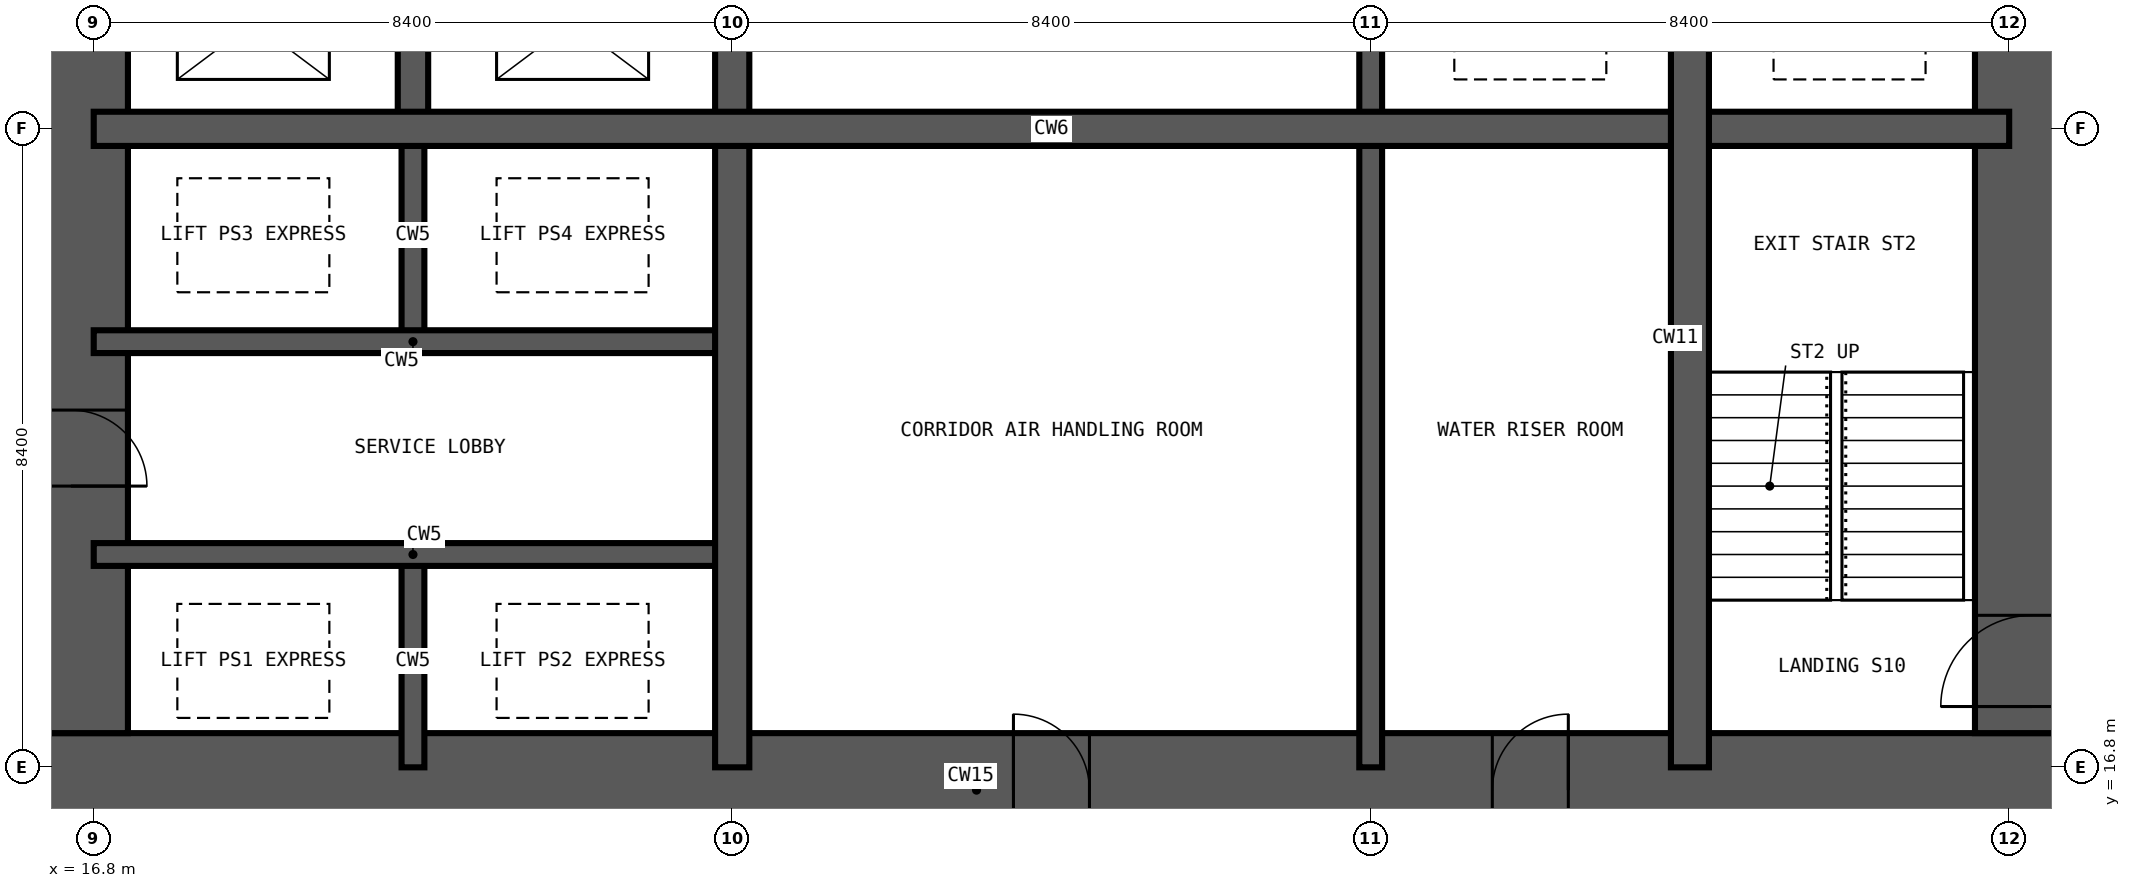
"""IFC4 building model, lengths in metres.
Left out: names, types, materials, properties, quantities, classifications, styles, units other than length and angle.
Written with IfcOpenShell. Run it as: python <this file> out.ifc"""

import sys

from ifc_helpers import new_model, si_unit, direction, frame, frame_2d, origin, place, context, subcontext, project, spatial, rectangle, extrude, element, fill, save


model = new_model("IFC4")
c1 = context("Model", 3, precision=1e-05, world=origin(), true_north=direction((0.0, 1.0)))
c2 = subcontext(c1, "Body", "Model", "MODEL_VIEW")
j1 = project(units=[si_unit("LENGTHUNIT", "METRE"), si_unit("PLANEANGLEUNIT", "RADIAN")], contexts=[c1])
p1 = place(None, origin())
s1 = spatial("IfcSite", under=j1, at=p1, CompositionType="ELEMENT")
p2 = place(p1, origin())
s2 = spatial("IfcBuilding", under=s1, at=p2, CompositionType="ELEMENT")
p3 = place(p2, frame((0.0, 0.0, 52.2)))
s3 = spatial("IfcBuildingStorey", under=s2, at=p3, CompositionType="ELEMENT", Elevation=52.2)
p4 = place(p3, frame((15.75, 16.5, -0.35), z_axis=(0.0, 0.0, 1.0), x_axis=(1.0, 0.0, 0.0)))
e1 = element("IfcWall", 1, at=p4, inside=s3, PredefinedType="SHEAR", context=c2, shape_type="SweptSolid", body=[
    extrude(rectangle(XDim=27.3, YDim=1.5, at=frame_2d((13.65, 0.0))), origin(), (0.0, 0.0, 1.0), 3.6),
])
p5 = place(p4, frame((13.15, 0.0, 0.35)))
e2 = element("IfcOpeningElement", 2, at=p5, cuts=e1, PredefinedType="OPENING", context=c2, shape_type="SweptSolid", body=[
    extrude(rectangle(XDim=1.0, YDim=2.1, at=frame_2d((0.5, 1.05))), frame((0.0, 0.76, 0.0), z_axis=(0.0, -1.0, 0.0), x_axis=(1.0, 0.0, 0.0)), (0.0, 0.0, 1.0), 1.52),
])
p6 = place(p4, frame((19.45, 0.0, 0.35)))
e3 = element("IfcOpeningElement", 3, at=p6, cuts=e1, PredefinedType="OPENING", context=c2, shape_type="SweptSolid", body=[
    extrude(rectangle(XDim=1.0, YDim=2.1, at=frame_2d((0.5, 1.05))), frame((0.0, 0.76, 0.0), z_axis=(0.0, -1.0, 0.0), x_axis=(1.0, 0.0, 0.0)), (0.0, 0.0, 1.0), 1.52),
])
p7 = place(p3, frame((42.3, 17.25, -0.35), z_axis=(0.0, 0.0, 1.0), x_axis=(0.0, 1.0, 0.0)))
e4 = element("IfcWall", 4, at=p7, inside=s3, PredefinedType="SHEAR", context=c2, shape_type="SweptSolid", body=[
    extrude(rectangle(XDim=24.3, YDim=1.5, at=frame_2d((12.15, 0.0))), origin(), (0.0, 0.0, 1.0), 3.6),
])
p8 = place(p7, frame((0.35, 0.0, 0.35)))
e5 = element("IfcOpeningElement", 5, at=p8, cuts=e4, PredefinedType="OPENING", context=c2, shape_type="SweptSolid", body=[
    extrude(rectangle(XDim=1.2, YDim=2.2, at=frame_2d((0.6, 1.1))), frame((0.0, 0.76, 0.0), z_axis=(0.0, -1.0, 0.0), x_axis=(1.0, 0.0, 0.0)), (0.0, 0.0, 1.0), 1.52),
])
p9 = place(p7, frame((11.65, 0.0, 0.35)))
e6 = element("IfcOpeningElement", 6, at=p9, cuts=e4, PredefinedType="OPENING", context=c2, shape_type="SweptSolid", body=[
    extrude(rectangle(XDim=1.0, YDim=2.1, at=frame_2d((0.5, 1.05))), frame((0.0, 0.76, 0.0), z_axis=(0.0, -1.0, 0.0), x_axis=(1.0, 0.0, 0.0)), (0.0, 0.0, 1.0), 1.52),
])
p10 = place(p7, frame((20.05, 0.0, 0.35)))
e7 = element("IfcOpeningElement", 7, at=p10, cuts=e4, PredefinedType="OPENING", context=c2, shape_type="SweptSolid", body=[
    extrude(rectangle(XDim=1.0, YDim=2.1, at=frame_2d((0.5, 1.05))), frame((0.0, 0.76, 0.0), z_axis=(0.0, -1.0, 0.0), x_axis=(1.0, 0.0, 0.0)), (0.0, 0.0, 1.0), 1.52),
])
p11 = place(p3, frame((16.5, 41.55, -0.35), z_axis=(0.0, 0.0, 1.0), x_axis=(0.0, -1.0, 0.0)))
e8 = element("IfcWall", 8, at=p11, inside=s3, PredefinedType="SHEAR", context=c2, shape_type="SweptSolid", body=[
    extrude(rectangle(XDim=24.3, YDim=1.5, at=frame_2d((12.15, 0.0))), origin(), (0.0, 0.0, 1.0), 3.6),
])
p12 = place(p11, frame((11.25, 0.0, 0.35)))
e9 = element("IfcOpeningElement", 9, at=p12, cuts=e8, PredefinedType="OPENING", context=c2, shape_type="SweptSolid", body=[
    extrude(rectangle(XDim=1.8, YDim=2.2, at=frame_2d((0.9, 1.1))), frame((0.0, 0.76, 0.0), z_axis=(0.0, -1.0, 0.0), x_axis=(1.0, 0.0, 0.0)), (0.0, 0.0, 1.0), 1.52),
])
p13 = place(p11, frame((20.05, 0.0, 0.35)))
e10 = element("IfcOpeningElement", 10, at=p13, cuts=e8, PredefinedType="OPENING", context=c2, shape_type="SweptSolid", body=[
    extrude(rectangle(XDim=1.0, YDim=2.1, at=frame_2d((0.5, 1.05))), frame((0.0, 0.76, 0.0), z_axis=(0.0, -1.0, 0.0), x_axis=(1.0, 0.0, 0.0)), (0.0, 0.0, 1.0), 1.52),
])
p14 = place(p11, frame((5.35, 0.0, 0.35)))
e11 = element("IfcOpeningElement", 11, at=p14, cuts=e8, PredefinedType="OPENING", context=c2, shape_type="SweptSolid", body=[
    extrude(rectangle(XDim=1.0, YDim=2.1, at=frame_2d((0.5, 1.05))), frame((0.0, 0.76, 0.0), z_axis=(0.0, -1.0, 0.0), x_axis=(1.0, 0.0, 0.0)), (0.0, 0.0, 1.0), 1.52),
])
for number, where, z_axis, x_axis in (
    (12, (21.0, 16.8, -0.35), (0.0, 0.0, 1.0), (0.0, 1.0, 0.0)),
    (13, (21.0, 22.4, -0.35), (0.0, 0.0, 1.0), (0.0, 1.0, 0.0)),
):
    element("IfcWall", number, at=place(p3, frame(where, z_axis=z_axis, x_axis=x_axis)), inside=s3, PredefinedType="SHEAR", context=c2, shape_type="SweptSolid", body=[
        extrude(rectangle(XDim=2.8, YDim=0.3, at=frame_2d((1.4, 0.0))), origin(), (0.0, 0.0, 1.0), 3.6),
    ])
p15 = place(p3, frame((33.6, 16.8, -0.35), z_axis=(0.0, 0.0, 1.0), x_axis=(0.0, 1.0, 0.0)))
e14 = element("IfcWall", 14, at=p15, inside=s3, PredefinedType="SHEAR", context=c2, shape_type="SweptSolid", body=[
    extrude(rectangle(XDim=25.2, YDim=0.3, at=frame_2d((12.6, 0.0))), origin(), (0.0, 0.0, 1.0), 3.6),
])
p16 = place(p15, frame((22.5, 0.0, 0.35)))
e15 = element("IfcOpeningElement", 15, at=p16, cuts=e14, PredefinedType="OPENING", context=c2, shape_type="SweptSolid", body=[
    extrude(rectangle(XDim=1.2, YDim=2.2, at=frame_2d((0.6, 1.1))), frame((0.0, 0.16, 0.0), z_axis=(0.0, -1.0, 0.0), x_axis=(1.0, 0.0, 0.0)), (0.0, 0.0, 1.0), 0.32),
])
p17 = place(p15, frame((18.3, 0.0, 0.35)))
e16 = element("IfcOpeningElement", 16, at=p17, cuts=e14, PredefinedType="OPENING", context=c2, shape_type="SweptSolid", body=[
    extrude(rectangle(XDim=1.2, YDim=2.2, at=frame_2d((0.6, 1.1))), frame((0.0, 0.16, 0.0), z_axis=(0.0, -1.0, 0.0), x_axis=(1.0, 0.0, 0.0)), (0.0, 0.0, 1.0), 0.32),
])
p18 = place(p15, frame((12.1, 0.0, 0.35)))
e17 = element("IfcOpeningElement", 17, at=p18, cuts=e14, PredefinedType="OPENING", context=c2, shape_type="SweptSolid", body=[
    extrude(rectangle(XDim=1.0, YDim=2.1, at=frame_2d((0.5, 1.05))), frame((0.0, 0.16, 0.0), z_axis=(0.0, -1.0, 0.0), x_axis=(1.0, 0.0, 0.0)), (0.0, 0.0, 1.0), 0.32),
])
for number, where, z_axis, x_axis in (
    (18, (16.8, 19.6, -0.35), (0.0, 0.0, 1.0), (1.0, 0.0, 0.0)),
    (19, (16.8, 22.4, -0.35), (0.0, 0.0, 1.0), (1.0, 0.0, 0.0)),
):
    element("IfcWall", number, at=place(p3, frame(where, z_axis=z_axis, x_axis=x_axis)), inside=s3, PredefinedType="SHEAR", context=c2, shape_type="SweptSolid", body=[
        extrude(rectangle(XDim=8.4, YDim=0.3, at=frame_2d((4.2, 0.0))), origin(), (0.0, 0.0, 1.0), 3.6),
    ])
p19 = place(p3, frame((21.0, 25.2, -0.35), z_axis=(0.0, 0.0, 1.0), x_axis=(0.0, 1.0, 0.0)))
e20 = element("IfcWall", 20, at=p19, inside=s3, PredefinedType="SHEAR", context=c2, shape_type="SweptSolid", body=[
    extrude(rectangle(XDim=2.8, YDim=0.4, at=frame_2d((1.4, 0.0))), origin(), (0.0, 0.0, 1.0), 3.6),
])
for number, where, z_axis, x_axis in (
    (21, (25.2, 16.8, -0.35), (0.0, 0.0, 1.0), (0.0, 1.0, 0.0)),
    (22, (16.8, 25.2, -0.35), (0.0, 0.0, 1.0), (1.0, 0.0, 0.0)),
):
    element("IfcWall", number, at=place(p3, frame(where, z_axis=z_axis, x_axis=x_axis)), inside=s3, PredefinedType="SHEAR", context=c2, shape_type="SweptSolid", body=[
        extrude(rectangle(XDim=25.2, YDim=0.45, at=frame_2d((12.6, 0.0))), origin(), (0.0, 0.0, 1.0), 3.6),
    ])
p20 = place(p3, frame((37.8, 16.8, -0.35), z_axis=(0.0, 0.0, 1.0), x_axis=(0.0, 1.0, 0.0)))
e23 = element("IfcWall", 23, at=p20, inside=s3, PredefinedType="SHEAR", context=c2, shape_type="SweptSolid", body=[
    extrude(rectangle(XDim=11.2, YDim=0.5, at=frame_2d((5.6, 0.0))), origin(), (0.0, 0.0, 1.0), 3.6),
])
p21 = place(p8, origin())
e24 = element("IfcDoor", 24, at=p21, inside=s3, OperationType="SINGLE_SWING_LEFT", PredefinedType="DOOR", context=c2, shape_type="SweptSolid", body=[
    extrude(rectangle(XDim=1.2, YDim=2.2, at=frame_2d((0.6, 1.1))), frame((0.0, 0.025, 0.0), z_axis=(0.0, -1.0, 0.0), x_axis=(1.0, 0.0, 0.0)), (0.0, 0.0, 1.0), 0.05),
])
fill(e5, e24)
p22 = place(p13, origin())
e25 = element("IfcDoor", 25, at=p22, inside=s3, OperationType="SINGLE_SWING_RIGHT", PredefinedType="DOOR", context=c2, shape_type="SweptSolid", body=[
    extrude(rectangle(XDim=1.0, YDim=2.1, at=frame_2d((0.5, 1.05))), frame((0.0, 0.025, 0.0), z_axis=(0.0, -1.0, 0.0), x_axis=(1.0, 0.0, 0.0)), (0.0, 0.0, 1.0), 0.05),
])
fill(e10, e25)
p23 = place(p5, origin())
e26 = element("IfcDoor", 26, at=p23, inside=s3, OperationType="SINGLE_SWING_LEFT", PredefinedType="DOOR", context=c2, shape_type="SweptSolid", body=[
    extrude(rectangle(XDim=1.0, YDim=2.1, at=frame_2d((0.5, 1.05))), frame((0.0, 0.025, 0.0), z_axis=(0.0, -1.0, 0.0), x_axis=(1.0, 0.0, 0.0)), (0.0, 0.0, 1.0), 0.05),
])
fill(e2, e26)
p24 = place(p6, origin())
e27 = element("IfcDoor", 27, at=p24, inside=s3, OperationType="SINGLE_SWING_RIGHT", PredefinedType="DOOR", context=c2, shape_type="SweptSolid", body=[
    extrude(rectangle(XDim=1.0, YDim=2.1, at=frame_2d((0.5, 1.05))), frame((0.0, 0.025, 0.0), z_axis=(0.0, -1.0, 0.0), x_axis=(1.0, 0.0, 0.0)), (0.0, 0.0, 1.0), 0.05),
])
fill(e3, e27)
save(model, sys.argv[1])
